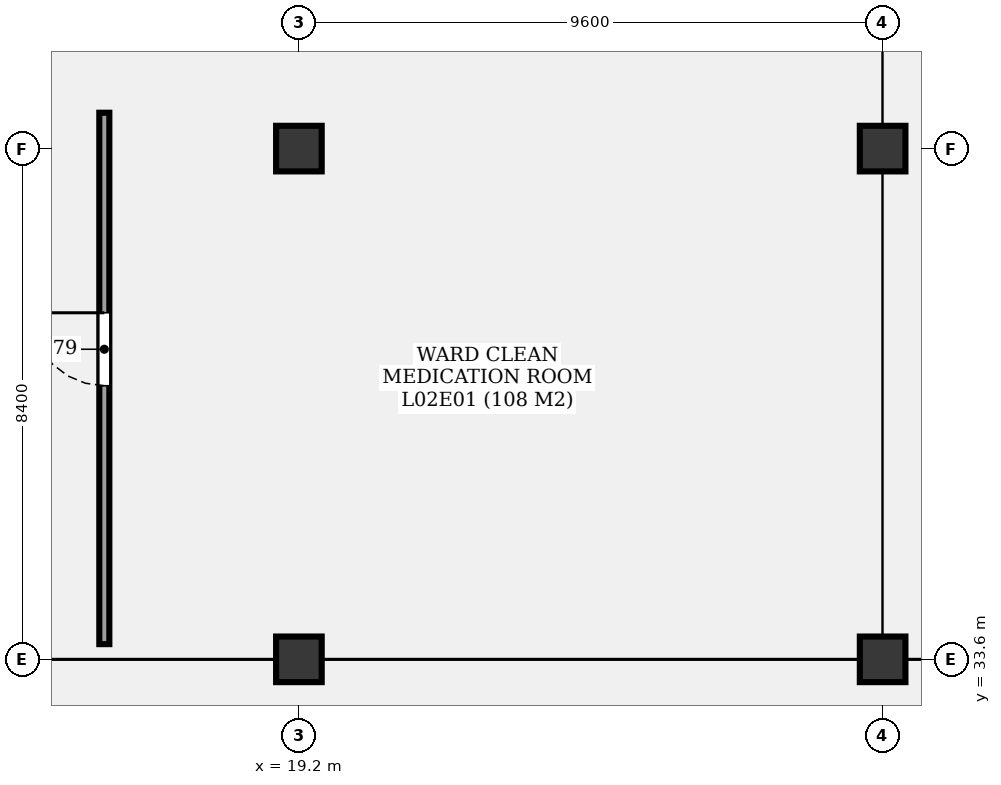
"""IFC4 building model, lengths in metres.
Left out: names, types, materials, properties, quantities, classifications, styles, units other than length and angle.
Written with IfcOpenShell. Run it as: python <this file> out.ifc"""

import sys

from ifc_helpers import new_model, si_unit, direction, frame, frame_2d, origin, origin_2d, place, context, subcontext, project, spatial, rectangle, extrude, element, fill, save


model = new_model("IFC4")
c1 = context("Model", 3, precision=1e-05, world=origin(), true_north=direction((0.0, 1.0)))
c2 = subcontext(c1, "Body", "Model", "MODEL_VIEW")
j1 = project(units=[si_unit("LENGTHUNIT", "METRE"), si_unit("PLANEANGLEUNIT", "RADIAN")], contexts=[c1])
p1 = place(None, origin())
s1 = spatial("IfcSite", under=j1, at=p1, CompositionType="ELEMENT")
p2 = place(p1, origin())
s2 = spatial("IfcBuilding", under=s1, at=p2, CompositionType="ELEMENT")
p3 = place(p2, frame((0.0, 0.0, 9.9)))
s3 = spatial("IfcBuildingStorey", under=s2, at=p3, CompositionType="ELEMENT", Elevation=9.9)
for number, where, z_axis, x_axis in (
    (1, (19.2, 33.6, 0.0), (0.0, 0.0, 1.0), (1.0, 0.0, 0.0)),
    (2, (19.2, 42.0, 0.0), (0.0, 0.0, 1.0), (1.0, 0.0, 0.0)),
    (3, (28.8, 33.6, 0.0), (0.0, 0.0, 1.0), (1.0, 0.0, 0.0)),
    (4, (28.8, 42.0, 0.0), (0.0, 0.0, 1.0), (1.0, 0.0, 0.0)),
):
    element("IfcColumn", number, at=place(p3, frame(where, z_axis=z_axis, x_axis=x_axis)), inside=s3, PredefinedType="COLUMN", context=c2, shape_type="SweptSolid", body=[
        extrude(rectangle(XDim=0.75, YDim=0.75, at=origin_2d()), origin(), (0.0, 0.0, 1.0), 3.6),
    ])
p4 = place(p3, frame((16.0, 33.85, 0.0), z_axis=(0.0, 0.0, 1.0), x_axis=(0.0, 1.0, 0.0)))
e5 = element("IfcWall", 5, at=p4, inside=s3, PredefinedType="PARTITIONING", context=c2, shape_type="SweptSolid", body=[
    extrude(rectangle(XDim=8.74, YDim=0.165, at=frame_2d((4.37, 0.0))), origin(), (0.0, 0.0, 1.0), 2.48),
])
p5 = place(p4, frame((4.25, 0.0, 0.0)))
e6 = element("IfcOpeningElement", 6, at=p5, cuts=e5, PredefinedType="OPENING", context=c2, shape_type="SweptSolid", body=[
    extrude(rectangle(XDim=1.2, YDim=2.4, at=frame_2d((0.6, 1.2))), frame((0.0, 0.093, 0.0), z_axis=(0.0, -1.0, 0.0), x_axis=(1.0, 0.0, 0.0)), (0.0, 0.0, 1.0), 0.185),
])
p6 = place(p5, origin())
e7 = element("IfcDoor", 7, at=p6, inside=s3, OperationType="SINGLE_SWING_RIGHT", PredefinedType="DOOR", context=c2, shape_type="SweptSolid", body=[
    extrude(rectangle(XDim=1.2, YDim=2.4, at=frame_2d((0.6, 1.2))), frame((0.0, 0.025, 0.0), z_axis=(0.0, -1.0, 0.0), x_axis=(1.0, 0.0, 0.0)), (0.0, 0.0, 1.0), 0.05),
])
fill(e6, e7)
save(model, sys.argv[1])
